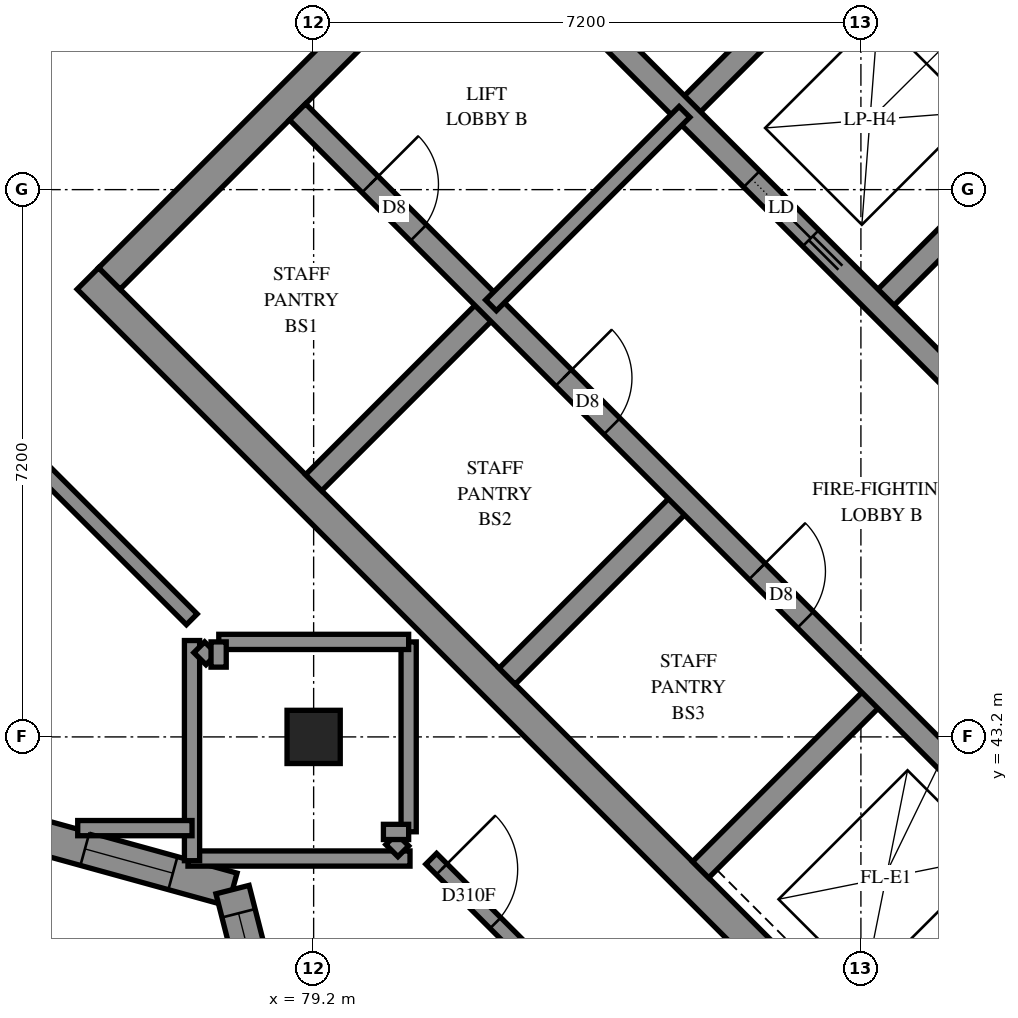
"""IFC4 building model, lengths in metres.
Left out: names, types, materials, properties, quantities, classifications, styles, units other than length and angle.
Written with IfcOpenShell. Run it as: python <this file> out.ifc"""

import sys

from ifc_helpers import new_model, si_unit, direction, frame, frame_2d, origin, origin_2d, place, context, subcontext, project, spatial, polyline, rectangle, outline, extrude, element, fill, save


model = new_model("IFC4")
c1 = context("Model", 3, precision=1e-05, world=origin(), true_north=direction((0.0, 1.0)))
c2 = subcontext(c1, "Body", "Model", "MODEL_VIEW")
j1 = project(units=[si_unit("LENGTHUNIT", "METRE"), si_unit("PLANEANGLEUNIT", "RADIAN")], contexts=[c1])
p1 = place(None, origin())
s1 = spatial("IfcSite", under=j1, at=p1, CompositionType="ELEMENT")
p2 = place(p1, origin())
s2 = spatial("IfcBuilding", under=s1, at=p2, CompositionType="ELEMENT")
p3 = place(p2, frame((0.0, 0.0, 254.0)))
s3 = spatial("IfcBuildingStorey", under=s2, at=p3, CompositionType="ELEMENT", Elevation=254.0)
p4 = place(p3, frame((79.2, 43.2, 0.0), z_axis=(0.0, 0.0, 1.0), x_axis=(1.0, 0.0, 0.0)))
e1 = element("IfcColumn", 1, at=p4, inside=s3, PredefinedType="COLUMN", context=c2, shape_type="SweptSolid", body=[
    extrude(rectangle(XDim=0.7, YDim=0.7, at=origin_2d()), origin(), (0.0, 0.0, 1.0), 3.1),
])
p5 = place(p3, frame((76.23, 49.231, -0.3), z_axis=(0.0, 0.0, 1.0), x_axis=(0.7071034917, -0.7071100706, 0.0)))
e2 = element("IfcWall", 2, at=p5, inside=s3, PredefinedType="SHEAR", context=c2, shape_type="SweptSolid", body=[
    extrude(rectangle(XDim=15.2, YDim=0.4, at=frame_2d((7.6, 0.0))), origin(), (0.0, 0.0, 1.0), 2.7),
])
p6 = place(p3, frame((86.695, 59.696, -0.3), z_axis=(0.0, 0.0, 1.0), x_axis=(0.7071100706, -0.7071034917, 0.0)))
e3 = element("IfcWall", 3, at=p6, inside=s3, PredefinedType="SHEAR", context=c2, shape_type="SweptSolid", body=[
    extrude(rectangle(XDim=15.2, YDim=0.4, at=frame_2d((7.6, 0.0))), origin(), (0.0, 0.0, 1.0), 2.7),
])
p7 = place(p6, frame((10.4, 0.0, 0.3)))
e4 = element("IfcOpeningElement", 4, at=p7, cuts=e3, PredefinedType="OPENING", context=c2, shape_type="SweptSolid", body=[
    extrude(rectangle(XDim=0.8, YDim=2.1, at=frame_2d((0.4, 1.05))), frame((0.0, 0.21, 0.0), z_axis=(0.0, -1.0, 0.0), x_axis=(1.0, 0.0, 0.0)), (0.0, 0.0, 1.0), 0.42),
])
p8 = place(p3, frame((76.513, 49.231, -0.3), z_axis=(0.0, 0.0, 1.0), x_axis=(0.7071067812, 0.7071067812, 0.0)))
e5 = element("IfcWall", 5, at=p8, inside=s3, PredefinedType="SHEAR", context=c2, shape_type="SweptSolid", body=[
    extrude(rectangle(XDim=14.4, YDim=0.4, at=frame_2d((7.2, 0.0))), origin(), (0.0, 0.0, 1.0), 2.7),
])
p9 = place(p8, frame((4.55, 0.0, 0.3)))
e6 = element("IfcOpeningElement", 6, at=p9, cuts=e5, PredefinedType="OPENING", context=c2, shape_type="SweptSolid", body=[
    extrude(rectangle(XDim=1.1, YDim=2.1, at=frame_2d((0.55, 1.05))), frame((0.0, 0.21, 0.0), z_axis=(0.0, -1.0, 0.0), x_axis=(1.0, 0.0, 0.0)), (0.0, 0.0, 1.0), 0.42),
])
p10 = place(p8, frame((11.35, 0.0, 0.3)))
e7 = element("IfcOpeningElement", 7, at=p10, cuts=e5, PredefinedType="OPENING", context=c2, shape_type="SweptSolid", body=[
    extrude(rectangle(XDim=1.1, YDim=2.1, at=frame_2d((0.55, 1.05))), frame((0.0, 0.21, 0.0), z_axis=(0.0, -1.0, 0.0), x_axis=(1.0, 0.0, 0.0)), (0.0, 0.0, 1.0), 0.42),
])
p11 = place(p3, frame((86.978, 38.766, -0.3), z_axis=(0.0, 0.0, 1.0), x_axis=(0.7071067812, 0.7071067812, 0.0)))
e8 = element("IfcWall", 8, at=p11, inside=s3, PredefinedType="SHEAR", context=c2, shape_type="SweptSolid", body=[
    extrude(rectangle(XDim=14.4, YDim=0.4, at=frame_2d((7.2, 0.0))), origin(), (0.0, 0.0, 1.0), 2.7),
])
p12 = place(p11, frame((4.55, 0.0, 0.3)))
e9 = element("IfcOpeningElement", 9, at=p12, cuts=e8, PredefinedType="OPENING", context=c2, shape_type="SweptSolid", body=[
    extrude(rectangle(XDim=1.1, YDim=2.1, at=frame_2d((0.55, 1.05))), frame((0.0, 0.21, 0.0), z_axis=(0.0, -1.0, 0.0), x_axis=(1.0, 0.0, 0.0)), (0.0, 0.0, 1.0), 0.42),
])
p13 = place(p11, frame((11.35, 0.0, 0.3)))
e10 = element("IfcOpeningElement", 10, at=p13, cuts=e8, PredefinedType="OPENING", context=c2, shape_type="SweptSolid", body=[
    extrude(rectangle(XDim=1.1, YDim=2.1, at=frame_2d((0.55, 1.05))), frame((0.0, 0.21, 0.0), z_axis=(0.0, -1.0, 0.0), x_axis=(1.0, 0.0, 0.0)), (0.0, 0.0, 1.0), 0.42),
])
for number, where, z_axis, x_axis in (
    (11, (79.2, 46.544, 0.0), (0.0, 0.0, 1.0), (0.707, 0.707, 0.0)),
    (12, (84.079, 51.423, 0.0), (0.0, 0.0, 1.0), (0.707, 0.707, 0.0)),
):
    element("IfcWall", number, at=place(p3, frame(where, z_axis=z_axis, x_axis=x_axis)), inside=s3, PredefinedType="SOLIDWALL", context=c2, shape_type="SweptSolid", body=[
        extrude(rectangle(XDim=3.3, YDim=0.3, at=frame_2d((1.65, 0.0))), origin(), (0.0, 0.0, 1.0), 3.1),
    ])
p14 = place(p3, frame((81.746, 43.999, 0.0), z_axis=(0.0, 0.0, 1.0), x_axis=(0.7071067812, 0.7071067812, 0.0)))
e13 = element("IfcWall", 13, at=p14, inside=s3, PredefinedType="SOLIDWALL", context=c2, shape_type="SweptSolid", body=[
    extrude(rectangle(XDim=3.3, YDim=0.3, at=frame_2d((1.65, 0.0))), origin(), (0.0, 0.0, 1.0), 3.1),
])
p15 = place(p3, frame((86.625, 48.878, 0.0), z_axis=(0.0, 0.0, 1.0), x_axis=(0.7071067812, 0.7071067812, 0.0)))
e14 = element("IfcWall", 14, at=p15, inside=s3, PredefinedType="SOLIDWALL", context=c2, shape_type="SweptSolid", body=[
    extrude(rectangle(XDim=3.3, YDim=0.3, at=frame_2d((1.65, 0.0))), origin(), (0.0, 0.0, 1.0), 3.1),
])
p16 = place(p3, frame((84.291, 41.453, 0.0), z_axis=(0.0, 0.0, 1.0), x_axis=(0.7071067812, 0.7071067812, 0.0)))
e15 = element("IfcWall", 15, at=p16, inside=s3, PredefinedType="SOLIDWALL", context=c2, shape_type="SweptSolid", body=[
    extrude(rectangle(XDim=3.3, YDim=0.3, at=frame_2d((1.65, 0.0))), origin(), (0.0, 0.0, 1.0), 3.1),
])
p17 = place(p3, frame((78.988, 51.423, 0.0), z_axis=(0.0, 0.0, 1.0), x_axis=(0.7071067812, -0.7071067812, 0.0)))
e16 = element("IfcWall", 16, at=p17, inside=s3, PredefinedType="SOLIDWALL", context=c2, shape_type="SweptSolid", body=[
    extrude(rectangle(XDim=14.4, YDim=0.3, at=frame_2d((7.2, 0.0))), origin(), (0.0, 0.0, 1.0), 3.1),
])
p18 = place(p17, frame((1.35, 0.0, 0.0)))
e17 = element("IfcOpeningElement", 17, at=p18, cuts=e16, PredefinedType="OPENING", context=c2, shape_type="SweptSolid", body=[
    extrude(rectangle(XDim=0.9, YDim=2.1, at=frame_2d((0.45, 1.05))), frame((0.0, 0.16, 0.0), z_axis=(0.0, -1.0, 0.0), x_axis=(1.0, 0.0, 0.0)), (0.0, 0.0, 1.0), 0.32),
])
p19 = place(p17, frame((4.95, 0.0, 0.0)))
e18 = element("IfcOpeningElement", 18, at=p19, cuts=e16, PredefinedType="OPENING", context=c2, shape_type="SweptSolid", body=[
    extrude(rectangle(XDim=0.9, YDim=2.1, at=frame_2d((0.45, 1.05))), frame((0.0, 0.16, 0.0), z_axis=(0.0, -1.0, 0.0), x_axis=(1.0, 0.0, 0.0)), (0.0, 0.0, 1.0), 0.32),
])
p20 = place(p17, frame((8.55, 0.0, 0.0)))
e19 = element("IfcOpeningElement", 19, at=p20, cuts=e16, PredefinedType="OPENING", context=c2, shape_type="SweptSolid", body=[
    extrude(rectangle(XDim=0.9, YDim=2.1, at=frame_2d((0.45, 1.05))), frame((0.0, 0.16, 0.0), z_axis=(0.0, -1.0, 0.0), x_axis=(1.0, 0.0, 0.0)), (0.0, 0.0, 1.0), 0.32),
])
p21 = place(p17, frame((12.05, 0.0, 0.0)))
e20 = element("IfcOpeningElement", 20, at=p21, cuts=e16, PredefinedType="OPENING", context=c2, shape_type="SweptSolid", body=[
    extrude(rectangle(XDim=1.1, YDim=2.1, at=frame_2d((0.55, 1.05))), frame((0.0, 0.16, 0.0), z_axis=(0.0, -1.0, 0.0), x_axis=(1.0, 0.0, 0.0)), (0.0, 0.0, 1.0), 0.32),
])
p22 = place(p3, frame((81.534, 53.969, 0.0), z_axis=(0.0, 0.0, 1.0), x_axis=(0.707103309, -0.7071102534, 0.0)))
e21 = element("IfcWall", 21, at=p22, inside=s3, PredefinedType="SOLIDWALL", context=c2, shape_type="SweptSolid", body=[
    extrude(rectangle(XDim=14.4, YDim=0.3, at=frame_2d((7.2, 0.0))), origin(), (0.0, 0.0, 1.0), 3.1),
])
p23 = place(p22, frame((8.55, 0.0, 0.0)))
e22 = element("IfcOpeningElement", 22, at=p23, cuts=e21, PredefinedType="OPENING", context=c2, shape_type="SweptSolid", body=[
    extrude(rectangle(XDim=0.9, YDim=2.1, at=frame_2d((0.45, 1.05))), frame((0.0, 0.16, 0.0), z_axis=(0.0, -1.0, 0.0), x_axis=(1.0, 0.0, 0.0)), (0.0, 0.0, 1.0), 0.32),
])
p24 = place(p22, frame((1.25, 0.0, 0.0)))
e23 = element("IfcOpeningElement", 23, at=p24, cuts=e21, PredefinedType="OPENING", context=c2, shape_type="SweptSolid", body=[
    extrude(rectangle(XDim=1.1, YDim=2.1, at=frame_2d((0.55, 1.05))), frame((0.0, 0.16, 0.0), z_axis=(0.0, -1.0, 0.0), x_axis=(1.0, 0.0, 0.0)), (0.0, 0.0, 1.0), 0.32),
])
p25 = place(p22, frame((4.85, 0.0, 0.0)))
e24 = element("IfcOpeningElement", 24, at=p25, cuts=e21, PredefinedType="OPENING", context=c2, shape_type="SweptSolid", body=[
    extrude(rectangle(XDim=1.1, YDim=2.1, at=frame_2d((0.55, 1.05))), frame((0.0, 0.16, 0.0), z_axis=(0.0, -1.0, 0.0), x_axis=(1.0, 0.0, 0.0)), (0.0, 0.0, 1.0), 0.32),
])
p26 = place(p22, frame((12.05, 0.0, 0.0)))
e25 = element("IfcOpeningElement", 25, at=p26, cuts=e21, PredefinedType="OPENING", context=c2, shape_type="SweptSolid", body=[
    extrude(rectangle(XDim=1.1, YDim=2.1, at=frame_2d((0.55, 1.05))), frame((0.0, 0.16, 0.0), z_axis=(0.0, -1.0, 0.0), x_axis=(1.0, 0.0, 0.0)), (0.0, 0.0, 1.0), 0.32),
])
p27 = place(p3, frame((83.867, 56.302, 0.0), z_axis=(0.0, 0.0, 1.0), x_axis=(0.7071137256, -0.7070998367, 0.0)))
e26 = element("IfcWall", 26, at=p27, inside=s3, PredefinedType="SOLIDWALL", context=c2, shape_type="SweptSolid", body=[
    extrude(rectangle(XDim=7.2, YDim=0.3, at=frame_2d((3.6, 0.0))), origin(), (0.0, 0.0, 1.0), 3.1),
])
p28 = place(p3, frame((74.372, 42.228, 0.0), z_axis=(0.0, 0.0, 1.0), x_axis=(0.9640145949, -0.2658493196, 0.0)))
e27 = element("IfcWall", 27, at=p28, inside=s3, PredefinedType="SOLIDWALL", context=c2, shape_type="SweptSolid", body=[
    extrude(outline(polyline([(0.043, -0.225), (3.771, -0.225), (4.032, 0.225), (-0.043, 0.225), (0.043, -0.225)])), origin(), (0.0, 0.0, 1.0), 3.1),
])
p29 = place(p28, frame((1.887, 0.0, 0.45)))
e28 = element("IfcOpeningElement", 28, at=p29, cuts=e27, PredefinedType="OPENING", context=c2, shape_type="SweptSolid", body=[
    extrude(rectangle(XDim=1.2, YDim=2.55, at=frame_2d((0.6, 1.275))), frame((0.0, 0.235, 0.0), z_axis=(0.0, -1.0, 0.0), x_axis=(1.0, 0.0, 0.0)), (0.0, 0.0, 1.0), 0.47),
])
p30 = place(p3, frame((78.133, 41.191, 0.0), z_axis=(0.0, 0.0, 1.0), x_axis=(0.2471093733, -0.9689875942, 0.0)))
e29 = element("IfcWall", 29, at=p30, inside=s3, PredefinedType="SOLIDWALL", context=c2, shape_type="SweptSolid", body=[
    extrude(outline(polyline([(0.131, -0.225), (4.832, -0.225), (4.577, 0.225), (-0.131, 0.225), (0.131, -0.225)])), origin(), (0.0, 0.0, 1.0), 3.1),
])
p31 = place(p30, frame((0.321, 0.0, 0.45)))
e30 = element("IfcOpeningElement", 30, at=p31, cuts=e29, PredefinedType="OPENING", context=c2, shape_type="SweptSolid", body=[
    extrude(rectangle(XDim=1.2, YDim=2.55, at=frame_2d((0.6, 1.275))), frame((0.0, 0.235, 0.0), z_axis=(0.0, -1.0, 0.0), x_axis=(1.0, 0.0, 0.0)), (0.0, 0.0, 1.0), 0.47),
])
p32 = place(p30, frame((2.409, 0.0, 0.45)))
e31 = element("IfcOpeningElement", 31, at=p32, cuts=e29, PredefinedType="OPENING", context=c2, shape_type="SweptSolid", body=[
    extrude(rectangle(XDim=1.2, YDim=2.55, at=frame_2d((0.6, 1.275))), frame((0.0, 0.235, 0.0), z_axis=(0.0, -1.0, 0.0), x_axis=(1.0, 0.0, 0.0)), (0.0, 0.0, 1.0), 0.47),
])
p33 = place(p3, frame((81.534, 48.878, 0.0), z_axis=(0.0, 0.0, 1.0), x_axis=(0.707092892, 0.7071206701, 0.0)))
e32 = element("IfcWall", 32, at=p33, inside=s3, PredefinedType="PARTITIONING", context=c2, shape_type="SweptSolid", body=[
    extrude(rectangle(XDim=3.6, YDim=0.2, at=frame_2d((1.8, 0.0))), origin(), (0.0, 0.0, 1.0), 3.1),
])
p34 = place(p3, frame((84.944, 31.927, 0.0), z_axis=(0.0, 0.0, 1.0), x_axis=(0.7071768334, 0.7070367221, 0.0)))
e33 = element("IfcWall", 33, at=p34, inside=s3, PredefinedType="PARTITIONING", context=c2, shape_type="SweptSolid", body=[
    extrude(rectangle(XDim=14.274, YDim=0.2, at=frame_2d((7.137, 0.0))), origin(), (0.0, 0.0, 1.0), 3.1),
])
p35 = place(p3, frame((86.836, 35.514, 0.0), z_axis=(0.0, 0.0, 1.0), x_axis=(0.7071067812, 0.7071067812, 0.0)))
e34 = element("IfcWall", 34, at=p35, inside=s3, PredefinedType="PARTITIONING", context=c2, shape_type="SweptSolid", body=[
    extrude(rectangle(XDim=10.4, YDim=0.2, at=frame_2d((5.2, 0.0))), origin(), (0.0, 0.0, 1.0), 3.1),
])
p36 = place(p35, frame((9.207, 0.0, 0.0)))
e35 = element("IfcOpeningElement", 35, at=p36, cuts=e34, PredefinedType="OPENING", context=c2, shape_type="SweptSolid", body=[
    extrude(rectangle(XDim=1.0, YDim=2.1, at=frame_2d((0.5, 1.05))), frame((0.0, 0.11, 0.0), z_axis=(0.0, -1.0, 0.0), x_axis=(1.0, 0.0, 0.0)), (0.0, 0.0, 1.0), 0.22),
])
p37 = place(p3, frame((80.747, 41.597, 0.0), z_axis=(0.0, 0.0, 1.0), x_axis=(0.7071067812, -0.7071067812, 0.0)))
e36 = element("IfcWall", 36, at=p37, inside=s3, PredefinedType="PARTITIONING", context=c2, shape_type="SweptSolid", body=[
    extrude(rectangle(XDim=8.607, YDim=0.2, at=frame_2d((4.303, 0.0))), origin(), (0.0, 0.0, 1.0), 3.1),
])
p38 = place(p37, frame((0.195, 0.0, 0.0)))
e37 = element("IfcOpeningElement", 37, at=p38, cuts=e36, PredefinedType="OPENING", context=c2, shape_type="SweptSolid", body=[
    extrude(rectangle(XDim=1.0, YDim=2.1, at=frame_2d((0.5, 1.05))), frame((0.0, 0.11, 0.0), z_axis=(0.0, -1.0, 0.0), x_axis=(1.0, 0.0, 0.0)), (0.0, 0.0, 1.0), 0.22),
])
p39 = place(p37, frame((3.133, 0.0, 0.0)))
e38 = element("IfcOpeningElement", 38, at=p39, cuts=e36, PredefinedType="OPENING", context=c2, shape_type="SweptSolid", body=[
    extrude(rectangle(XDim=1.0, YDim=2.1, at=frame_2d((0.5, 1.05))), frame((0.0, 0.11, 0.0), z_axis=(0.0, -1.0, 0.0), x_axis=(1.0, 0.0, 0.0)), (0.0, 0.0, 1.0), 0.22),
])
p40 = place(p3, frame((74.347, 47.997, 0.0), z_axis=(0.0, 0.0, 1.0), x_axis=(0.7071067812, -0.7071067812, 0.0)))
e39 = element("IfcWall", 39, at=p40, inside=s3, PredefinedType="PARTITIONING", context=c2, shape_type="SweptSolid", body=[
    extrude(rectangle(XDim=4.596, YDim=0.2, at=frame_2d((2.298, 0.0))), origin(), (0.0, 0.0, 1.0), 3.1),
])
p41 = place(p40, frame((0.35, 0.0, 0.0)))
e40 = element("IfcOpeningElement", 40, at=p41, cuts=e39, PredefinedType="OPENING", context=c2, shape_type="SweptSolid", body=[
    extrude(rectangle(XDim=1.0, YDim=2.1, at=frame_2d((0.5, 1.05))), frame((0.0, 0.11, 0.0), z_axis=(0.0, -1.0, 0.0), x_axis=(1.0, 0.0, 0.0)), (0.0, 0.0, 1.0), 0.22),
])
p42 = place(p3, frame((77.546, 41.6, 0.0), z_axis=(0.0, 0.0, 1.0), x_axis=(1.0, 0.0, 0.0)))
e41 = element("IfcWall", 41, at=p42, inside=s3, PredefinedType="PARTITIONING", context=c2, shape_type="SweptSolid", body=[
    extrude(rectangle(XDim=2.921, YDim=0.2, at=frame_2d((1.461, 0.0))), origin(), (0.0, 0.0, 1.0), 3.1),
])
p43 = place(p3, frame((77.6, 41.572, 0.0), z_axis=(0.0, 0.0, 1.0), x_axis=(0.0, 1.0, 0.0)))
e42 = element("IfcWall", 42, at=p43, inside=s3, PredefinedType="PARTITIONING", context=c2, shape_type="SweptSolid", body=[
    extrude(rectangle(XDim=2.897, YDim=0.2, at=frame_2d((1.448, 0.0))), origin(), (0.0, 0.0, 1.0), 3.1),
])
for number, where, z_axis, x_axis in (
    (43, (80.45, 41.952, 0.0), (0.0, 0.0, 1.0), (0.0, 1.0, 0.0)),
    (44, (77.952, 44.45, 0.0), (0.0, 0.0, 1.0), (1.0, 0.0, 0.0)),
):
    element("IfcWall", number, at=place(p3, frame(where, z_axis=z_axis, x_axis=x_axis)), inside=s3, PredefinedType="PARTITIONING", context=c2, shape_type="SweptSolid", body=[
        extrude(rectangle(XDim=2.498, YDim=0.2, at=frame_2d((1.249, 0.0))), origin(), (0.0, 0.0, 1.0), 3.1),
    ])
p44 = place(p3, frame((76.096, 42.0, 0.0), z_axis=(0.0, 0.0, 1.0), x_axis=(1.0, 0.0, 0.0)))
e45 = element("IfcWall", 45, at=p44, inside=s3, PredefinedType="PARTITIONING", context=c2, shape_type="SweptSolid", body=[
    extrude(rectangle(XDim=1.504, YDim=0.2, at=frame_2d((0.752, 0.0))), origin(), (0.0, 0.0, 1.0), 3.1),
])
for number, where, z_axis, x_axis in (
    (46, (80.221, 41.855, 0.0), (0.0, 0.0, 1.0), (0.707, -0.707, 0.0)),
    (47, (77.695, 44.38, 0.0), (0.0, 0.0, 1.0), (0.707, -0.707, 0.0)),
):
    element("IfcWall", number, at=place(p3, frame(where, z_axis=z_axis, x_axis=x_axis)), inside=s3, PredefinedType="PARTITIONING", context=c2, shape_type="SweptSolid", body=[
        extrude(rectangle(XDim=0.225, YDim=0.2, at=frame_2d((0.112, 0.0))), origin(), (0.0, 0.0, 1.0), 3.1),
    ])
for number, where, z_axis, x_axis in (
    (48, (80.118, 41.95, 0.0), (0.0, 0.0, 1.0), (1.0, 0.0, 0.0)),
    (49, (77.95, 44.118, 0.0), (0.0, 0.0, 1.0), (0.0, 1.0, 0.0)),
):
    element("IfcWall", number, at=place(p3, frame(where, z_axis=z_axis, x_axis=x_axis)), inside=s3, PredefinedType="PARTITIONING", context=c2, shape_type="SweptSolid", body=[
        extrude(rectangle(XDim=0.332, YDim=0.2, at=frame_2d((0.166, 0.0))), origin(), (0.0, 0.0, 1.0), 3.1),
    ])
p45 = place(p29, origin())
e50 = element("IfcWindow", 50, at=p45, inside=s3, PartitioningType="SINGLE_PANEL", PredefinedType="WINDOW", context=c2, shape_type="SweptSolid", body=[
    extrude(rectangle(XDim=1.2, YDim=2.55, at=frame_2d((0.6, 1.275))), frame((0.0, 0.145, 0.0), z_axis=(0.0, -1.0, 0.0), x_axis=(1.0, 0.0, 0.0)), (0.0, 0.0, 1.0), 0.06),
])
fill(e28, e50)
p46 = place(p31, origin())
e51 = element("IfcWindow", 51, at=p46, inside=s3, PartitioningType="SINGLE_PANEL", PredefinedType="WINDOW", context=c2, shape_type="SweptSolid", body=[
    extrude(rectangle(XDim=1.2, YDim=2.55, at=frame_2d((0.6, 1.275))), frame((0.0, 0.205, 0.0), z_axis=(0.0, -1.0, 0.0), x_axis=(1.0, 0.0, 0.0)), (0.0, 0.0, 1.0), 0.06),
])
fill(e30, e51)
p47 = place(p18, origin())
e52 = element("IfcDoor", 52, at=p47, inside=s3, OperationType="SINGLE_SWING_LEFT", PredefinedType="DOOR", context=c2, shape_type="SweptSolid", body=[
    extrude(rectangle(XDim=0.9, YDim=2.1, at=frame_2d((0.45, 1.05))), frame((0.0, 0.025, 0.0), z_axis=(0.0, -1.0, 0.0), x_axis=(1.0, 0.0, 0.0)), (0.0, 0.0, 1.0), 0.05),
])
fill(e17, e52)
p48 = place(p19, origin())
e53 = element("IfcDoor", 53, at=p48, inside=s3, OperationType="SINGLE_SWING_LEFT", PredefinedType="DOOR", context=c2, shape_type="SweptSolid", body=[
    extrude(rectangle(XDim=0.9, YDim=2.1, at=frame_2d((0.45, 1.05))), frame((0.0, 0.025, 0.0), z_axis=(0.0, -1.0, 0.0), x_axis=(1.0, 0.0, 0.0)), (0.0, 0.0, 1.0), 0.05),
])
fill(e18, e53)
p49 = place(p20, origin())
e54 = element("IfcDoor", 54, at=p49, inside=s3, OperationType="SINGLE_SWING_LEFT", PredefinedType="DOOR", context=c2, shape_type="SweptSolid", body=[
    extrude(rectangle(XDim=0.9, YDim=2.1, at=frame_2d((0.45, 1.05))), frame((0.0, 0.025, 0.0), z_axis=(0.0, -1.0, 0.0), x_axis=(1.0, 0.0, 0.0)), (0.0, 0.0, 1.0), 0.05),
])
fill(e19, e54)
p50 = place(p25, origin())
e55 = element("IfcDoor", 55, at=p50, inside=s3, OperationType="SLIDING_TO_RIGHT", PredefinedType="DOOR", context=c2, shape_type="SweptSolid", body=[
    extrude(rectangle(XDim=1.1, YDim=2.1, at=frame_2d((0.55, 1.05))), frame((0.0, 0.025, 0.0), z_axis=(0.0, -1.0, 0.0), x_axis=(1.0, 0.0, 0.0)), (0.0, 0.0, 1.0), 0.05),
])
fill(e24, e55)
p51 = place(p38, origin())
e56 = element("IfcDoor", 56, at=p51, inside=s3, OperationType="SINGLE_SWING_LEFT", PredefinedType="DOOR", context=c2, shape_type="SweptSolid", body=[
    extrude(rectangle(XDim=1.0, YDim=2.1, at=frame_2d((0.5, 1.05))), frame((0.0, 0.025, 0.0), z_axis=(0.0, -1.0, 0.0), x_axis=(1.0, 0.0, 0.0)), (0.0, 0.0, 1.0), 0.05),
])
fill(e37, e56)
save(model, sys.argv[1])
